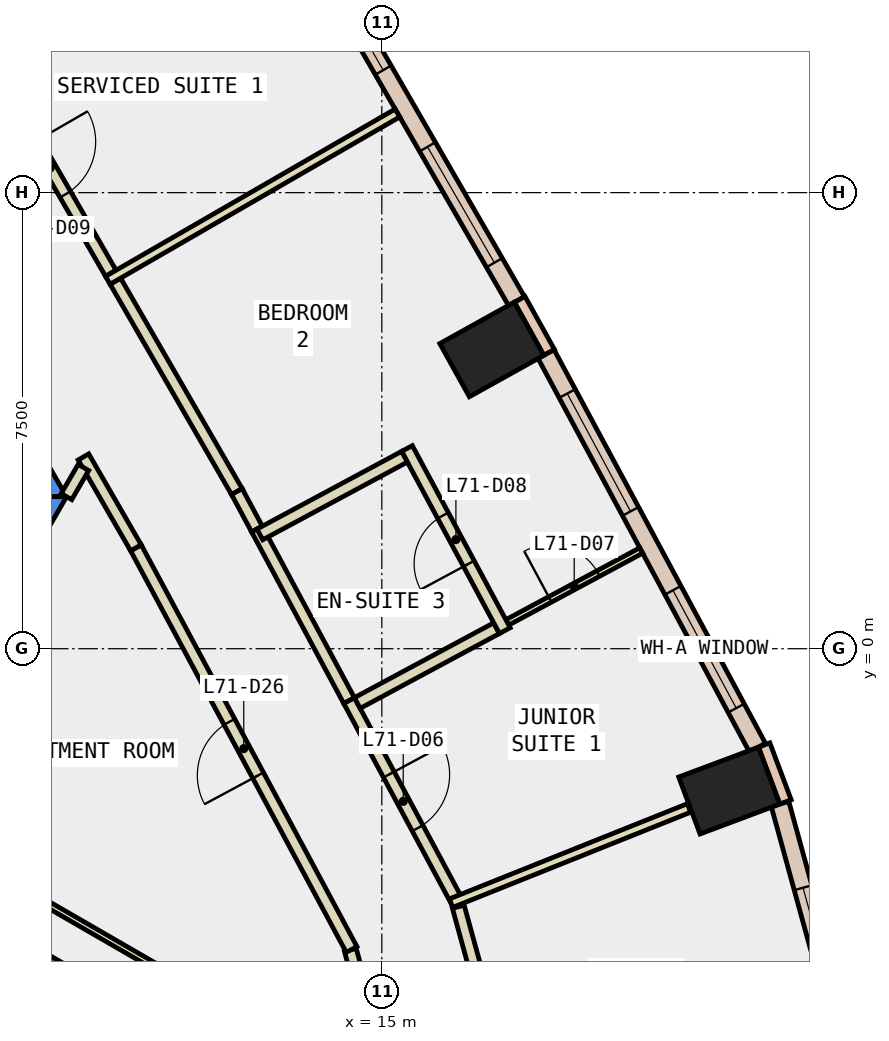
"""IFC4 building model, lengths in metres.
Left out: names, types, materials, properties, quantities, classifications, styles, units other than length and angle.
Written with IfcOpenShell. Run it as: python <this file> out.ifc"""

import sys

from ifc_helpers import new_model, si_unit, direction, frame, frame_2d, origin, origin_2d, place, context, subcontext, project, spatial, polyline, rectangle, outline, extrude, element, fill, save


model = new_model("IFC4")
c1 = context("Model", 3, precision=1e-05, world=origin(), true_north=direction((0.0, 1.0)))
c2 = subcontext(c1, "Body", "Model", "MODEL_VIEW")
j1 = project(units=[si_unit("LENGTHUNIT", "METRE"), si_unit("PLANEANGLEUNIT", "RADIAN")], contexts=[c1])
p1 = place(None, origin())
s1 = spatial("IfcSite", under=j1, at=p1, CompositionType="ELEMENT")
p2 = place(p1, origin())
s2 = spatial("IfcBuilding", under=s1, at=p2, CompositionType="ELEMENT")
p3 = place(p2, frame((0.0, 0.0, 304.4)))
s3 = spatial("IfcBuildingStorey", under=s2, at=p3, CompositionType="ELEMENT", Elevation=304.4)
for number, where, z_axis, x_axis in (
    (1, (20.714, -2.333, -0.34), (0.0, 0.0, 1.0), (-0.351, 0.936, 0.0)),
    (2, (16.809, 4.921, -0.34), (0.0, 0.0, 1.0), (-0.486, 0.874, 0.0)),
):
    element("IfcColumn", number, at=place(p3, frame(where, z_axis=z_axis, x_axis=x_axis)), inside=s3, PredefinedType="COLUMN", context=c2, shape_type="SweptSolid", body=[
        extrude(rectangle(XDim=1.0, YDim=1.4, at=origin_2d()), origin(), (0.0, 0.0, 1.0), 3.6),
    ])
p4 = place(p3, frame((0.0, 0.0, -0.34)))
e3 = element("IfcWall", 3, at=p4, inside=s3, PredefinedType="SHEAR", context=c2, shape_type="SweptSolid", body=[
    extrude(outline(polyline([(5.486, 9.998), (5.053, 9.748), (9.238, 2.5), (9.815, 2.5), (5.486, 9.998)])), origin(), (0.0, 0.0, 1.0), 3.6),
])
p5 = place(p3, frame((0.0, 0.0, -0.34)))
e4 = element("IfcWall", 4, at=p5, inside=s3, PredefinedType="SHEAR", context=c2, shape_type="SweptSolid", body=[
    extrude(outline(polyline([(4.907, -6.0), (9.815, 2.5), (9.238, 2.5), (4.619, -5.5), (4.907, -6.0)])), origin(), (0.0, 0.0, 1.0), 3.6),
])
p6 = place(p3, frame((6.279, -3.625, -0.34), z_axis=(0.0, 0.0, 1.0), x_axis=(0.866017533419, -0.500013631625, 0.0)))
e5 = element("IfcWall", 5, at=p6, inside=s3, PredefinedType="SHEAR", context=c2, shape_type="SweptSolid", body=[
    extrude(rectangle(XDim=9.0, YDim=0.8, at=frame_2d((4.5, 0.0))), origin(), (0.0, 0.0, 1.0), 3.6),
])
p7 = place(p3, frame((21.639, -2.52, 0.0), z_axis=(0.0, 0.0, 1.0), x_axis=(-0.350962844851, 0.936389385637, 0.0)))
e6 = element("IfcWall", 6, at=p7, inside=s3, PredefinedType="STANDARD", context=c2, shape_type="SweptSolid", body=[
    extrude(rectangle(XDim=1.0, YDim=0.2, at=frame_2d((0.5, 0.0))), origin(), (0.0, 0.0, 1.0), 3.26),
])
p8 = place(p3, frame((17.752, 4.872, 0.0), z_axis=(0.0, 0.0, 1.0), x_axis=(-0.485850211157, 0.874042088414, 0.0)))
e7 = element("IfcWall", 7, at=p8, inside=s3, PredefinedType="STANDARD", context=c2, shape_type="SweptSolid", body=[
    extrude(rectangle(XDim=1.0, YDim=0.2, at=frame_2d((0.5, 0.0))), origin(), (0.0, 0.0, 1.0), 3.26),
])
p9 = place(p3, frame((22.677, -6.659, 0.0), z_axis=(0.0, 0.0, 1.0), x_axis=(-0.264892613927, 0.964277917971, 0.0)))
e8 = element("IfcWall", 8, at=p9, inside=s3, PredefinedType="STANDARD", context=c2, shape_type="SweptSolid", body=[
    extrude(rectangle(XDim=4.258, YDim=0.3, at=frame_2d((2.129, 0.0))), origin(), (0.0, 0.0, 1.0), 3.26),
])
p10 = place(p9, frame((1.429, 0.0, 0.9)))
e9 = element("IfcOpeningElement", 9, at=p10, cuts=e8, PredefinedType="OPENING", context=c2, shape_type="SweptSolid", body=[
    extrude(rectangle(XDim=1.4, YDim=2.0, at=frame_2d((0.7, 1.0))), frame((0.0, 0.16, 0.0), z_axis=(0.0, -1.0, 0.0), x_axis=(1.0, 0.0, 0.0)), (0.0, 0.0, 1.0), 0.32),
])
p11 = place(p3, frame((21.177, -1.626, 0.0), z_axis=(0.0, 0.0, 1.0), x_axis=(-0.473225522632, 0.880941317415, 0.0)))
e10 = element("IfcWall", 10, at=p11, inside=s3, PredefinedType="STANDARD", context=c2, shape_type="SweptSolid", body=[
    extrude(rectangle(XDim=7.345, YDim=0.3, at=frame_2d((3.673, 0.0))), origin(), (0.0, 0.0, 1.0), 3.26),
])
p12 = place(p11, frame((0.736, 0.0, 0.9)))
e11 = element("IfcOpeningElement", 11, at=p12, cuts=e10, PredefinedType="OPENING", context=c2, shape_type="SweptSolid", body=[
    extrude(rectangle(XDim=2.2, YDim=2.0, at=frame_2d((1.1, 1.0))), frame((0.0, 0.16, 0.0), z_axis=(0.0, -1.0, 0.0), x_axis=(1.0, 0.0, 0.0)), (0.0, 0.0, 1.0), 0.32),
])
p13 = place(p11, frame((4.409, 0.0, 0.9)))
e12 = element("IfcOpeningElement", 12, at=p13, cuts=e10, PredefinedType="OPENING", context=c2, shape_type="SweptSolid", body=[
    extrude(rectangle(XDim=2.2, YDim=2.0, at=frame_2d((1.1, 1.0))), frame((0.0, 0.16, 0.0), z_axis=(0.0, -1.0, 0.0), x_axis=(1.0, 0.0, 0.0)), (0.0, 0.0, 1.0), 0.32),
])
p14 = place(p3, frame((17.215, 5.717, 0.0), z_axis=(0.0, 0.0, 1.0), x_axis=(-0.499905472729, 0.866079972252, 0.0)))
e13 = element("IfcWall", 13, at=p14, inside=s3, PredefinedType="STANDARD", context=c2, shape_type="SweptSolid", body=[
    extrude(rectangle(XDim=7.313, YDim=0.3, at=frame_2d((3.657, 0.0))), origin(), (0.0, 0.0, 1.0), 3.26),
])
p15 = place(p14, frame((0.728, 0.0, 0.9)))
e14 = element("IfcOpeningElement", 14, at=p15, cuts=e13, PredefinedType="OPENING", context=c2, shape_type="SweptSolid", body=[
    extrude(rectangle(XDim=2.2, YDim=2.0, at=frame_2d((1.1, 1.0))), frame((0.0, 0.16, 0.0), z_axis=(0.0, -1.0, 0.0), x_axis=(1.0, 0.0, 0.0)), (0.0, 0.0, 1.0), 0.32),
])
p16 = place(p14, frame((4.385, 0.0, 0.9)))
e15 = element("IfcOpeningElement", 15, at=p16, cuts=e13, PredefinedType="OPENING", context=c2, shape_type="SweptSolid", body=[
    extrude(rectangle(XDim=2.2, YDim=2.0, at=frame_2d((1.1, 1.0))), frame((0.0, 0.16, 0.0), z_axis=(0.0, -1.0, 0.0), x_axis=(1.0, 0.0, 0.0)), (0.0, 0.0, 1.0), 0.32),
])
p17 = place(p3, frame((14.779, -6.032, 0.0), z_axis=(0.0, 0.0, 1.0), x_axis=(-0.265740072272, 0.964044715762, 0.0)))
e16 = element("IfcWall", 16, at=p17, inside=s3, PredefinedType="PARTITIONING", context=c2, shape_type="SweptSolid", body=[
    extrude(rectangle(XDim=1.118, YDim=0.2, at=frame_2d((0.559, 0.0))), origin(), (0.0, 0.0, 1.0), 3.26),
])
p18 = place(p3, frame((14.503, -4.946, 0.0), z_axis=(0.0, 0.0, 1.0), x_axis=(-0.473101362557, 0.881008002658, 0.0)))
e17 = element("IfcWall", 17, at=p18, inside=s3, PredefinedType="PARTITIONING", context=c2, shape_type="SweptSolid", body=[
    extrude(rectangle(XDim=7.497, YDim=0.2, at=frame_2d((3.749, 0.0))), origin(), (0.0, 0.0, 1.0), 3.26),
])
p19 = place(p18, frame((3.249, 0.0, 0.0)))
e18 = element("IfcOpeningElement", 18, at=p19, cuts=e17, PredefinedType="OPENING", context=c2, shape_type="SweptSolid", body=[
    extrude(rectangle(XDim=1.0, YDim=2.1, at=frame_2d((0.5, 1.05))), frame((0.0, 0.11, 0.0), z_axis=(0.0, -1.0, 0.0), x_axis=(1.0, 0.0, 0.0)), (0.0, 0.0, 1.0), 0.22),
])
p20 = place(p3, frame((10.956, 1.659, 0.0), z_axis=(0.0, 0.0, 1.0), x_axis=(-0.49992648901, 0.866067841215, 0.0)))
e19 = element("IfcWall", 19, at=p20, inside=s3, PredefinedType="PARTITIONING", context=c2, shape_type="SweptSolid", body=[
    extrude(rectangle(XDim=1.726, YDim=0.2, at=frame_2d((0.863, 0.0))), origin(), (0.0, 0.0, 1.0), 3.26),
])
p21 = place(p3, frame((10.092, 2.981, 0.0), z_axis=(0.0, 0.0, 1.0), x_axis=(-0.501296484717, -0.865275582927, 0.0)))
e20 = element("IfcWall", 20, at=p21, inside=s3, PredefinedType="PARTITIONING", context=c2, shape_type="SweptSolid", body=[
    extrude(rectangle(XDim=0.555, YDim=0.2, at=frame_2d((0.277, 0.0))), origin(), (0.0, 0.0, 1.0), 3.26),
])
p22 = place(p3, frame((16.258, -4.244, 0.0), z_axis=(0.0, 0.0, 1.0), x_axis=(0.264930673246, -0.964267462053, 0.0)))
e21 = element("IfcWall", 21, at=p22, inside=s3, PredefinedType="PARTITIONING", context=c2, shape_type="SweptSolid", body=[
    extrude(rectangle(XDim=3.166, YDim=0.2, at=frame_2d((1.583, 0.0))), origin(), (0.0, 0.0, 1.0), 3.26),
])
p23 = place(p3, frame((14.461, -0.852, 0.0), z_axis=(0.0, 0.0, 1.0), x_axis=(0.473160180459, -0.88097641491, 0.0)))
e22 = element("IfcWall", 22, at=p23, inside=s3, PredefinedType="PARTITIONING", context=c2, shape_type="SweptSolid", body=[
    extrude(rectangle(XDim=3.766, YDim=0.2, at=frame_2d((1.883, 0.0))), origin(), (0.0, 0.0, 1.0), 3.26),
])
p24 = place(p23, frame((1.383, 0.0, 0.0)))
e23 = element("IfcOpeningElement", 23, at=p24, cuts=e22, PredefinedType="OPENING", context=c2, shape_type="SweptSolid", body=[
    extrude(rectangle(XDim=1.0, YDim=2.1, at=frame_2d((0.5, 1.05))), frame((0.0, 0.11, 0.0), z_axis=(0.0, -1.0, 0.0), x_axis=(1.0, 0.0, 0.0)), (0.0, 0.0, 1.0), 0.22),
])
p25 = place(p3, frame((10.618, 6.044, 0.0), z_axis=(0.0, 0.0, 1.0), x_axis=(0.50008212199, -0.86597798544, 0.0)))
e24 = element("IfcWall", 24, at=p25, inside=s3, PredefinedType="PARTITIONING", context=c2, shape_type="SweptSolid", body=[
    extrude(rectangle(XDim=3.995, YDim=0.2, at=frame_2d((1.998, 0.0))), origin(), (0.0, 0.0, 1.0), 3.26),
])
p26 = place(p3, frame((12.616, 2.584, 0.0), z_axis=(0.0, 0.0, 1.0), x_axis=(0.472830911699, -0.881153181315, 0.0)))
e25 = element("IfcWall", 25, at=p26, inside=s3, PredefinedType="PARTITIONING", context=c2, shape_type="SweptSolid", body=[
    extrude(rectangle(XDim=0.7, YDim=0.2, at=frame_2d((0.35, 0.0))), origin(), (0.0, 0.0, 1.0), 3.26),
])
p27 = place(p3, frame((12.947, 1.967, 0.0), z_axis=(0.0, 0.0, 1.0), x_axis=(0.473116768279, -0.88099972961, 0.0)))
e26 = element("IfcWall", 26, at=p27, inside=s3, PredefinedType="PARTITIONING", context=c2, shape_type="SweptSolid", body=[
    extrude(rectangle(XDim=3.2, YDim=0.2, at=frame_2d((1.6, 0.0))), origin(), (0.0, 0.0, 1.0), 3.26),
])
p28 = place(p3, frame((8.545, 9.634, 0.0), z_axis=(0.0, 0.0, 1.0), x_axis=(0.50008212199, -0.86597798544, 0.0)))
e27 = element("IfcWall", 27, at=p28, inside=s3, PredefinedType="PARTITIONING", context=c2, shape_type="SweptSolid", body=[
    extrude(rectangle(XDim=3.995, YDim=0.2, at=frame_2d((1.998, 0.0))), origin(), (0.0, 0.0, 1.0), 3.26),
])
p29 = place(p28, frame((1.498, 0.0, 0.0)))
e28 = element("IfcOpeningElement", 28, at=p29, cuts=e27, PredefinedType="OPENING", context=c2, shape_type="SweptSolid", body=[
    extrude(rectangle(XDim=1.0, YDim=2.1, at=frame_2d((0.5, 1.05))), frame((0.0, 0.11, 0.0), z_axis=(0.0, -1.0, 0.0), x_axis=(1.0, 0.0, 0.0)), (0.0, 0.0, 1.0), 0.22),
])
p30 = place(p3, frame((6.835, -2.662, 0.0), z_axis=(0.0, 0.0, 1.0), x_axis=(0.866023427642, -0.500003422764, 0.0)))
e29 = element("IfcWall", 29, at=p30, inside=s3, PredefinedType="PARTITIONING", context=c2, shape_type="SweptSolid", body=[
    extrude(rectangle(XDim=8.65, YDim=0.1, at=frame_2d((4.325, 0.0))), origin(), (0.0, 0.0, 1.0), 3.26),
])
p31 = place(p3, frame((16.138, -4.185, 0.0), z_axis=(0.0, 0.0, 1.0), x_axis=(0.928432751736, 0.371500505388, 0.0)))
e30 = element("IfcWall", 30, at=p31, inside=s3, PredefinedType="PARTITIONING", context=c2, shape_type="SweptSolid", body=[
    extrude(rectangle(XDim=4.216, YDim=0.15, at=frame_2d((2.108, 0.0))), origin(), (0.0, 0.0, 1.0), 3.26),
])
p32 = place(p3, frame((17.063, 0.432, 0.0), z_axis=(0.0, 0.0, 1.0), x_axis=(0.881003472222, 0.473109799024, 0.0)))
e31 = element("IfcWall", 31, at=p32, inside=s3, PredefinedType="PARTITIONING", context=c2, shape_type="SweptSolid", body=[
    extrude(rectangle(XDim=2.501, YDim=0.1, at=frame_2d((1.25, 0.0))), origin(), (0.0, 0.0, 1.0), 3.26),
])
p33 = place(p32, frame((0.8, 0.0, 0.0)))
e32 = element("IfcOpeningElement", 32, at=p33, cuts=e31, PredefinedType="OPENING", context=c2, shape_type="SweptSolid", body=[
    extrude(rectangle(XDim=0.9, YDim=2.1, at=frame_2d((0.45, 1.05))), frame((0.0, 0.06, 0.0), z_axis=(0.0, -1.0, 0.0), x_axis=(1.0, 0.0, 0.0)), (0.0, 0.0, 1.0), 0.12),
])
p34 = place(p3, frame((14.597, -0.893, 0.0), z_axis=(0.0, 0.0, 1.0), x_axis=(0.880971229432, 0.473169835168, 0.0)))
e33 = element("IfcWall", 33, at=p34, inside=s3, PredefinedType="PARTITIONING", context=c2, shape_type="SweptSolid", body=[
    extrude(rectangle(XDim=2.599, YDim=0.2, at=frame_2d((1.3, 0.0))), origin(), (0.0, 0.0, 1.0), 3.26),
])
p35 = place(p3, frame((17.023, 0.297, 0.0), z_axis=(0.0, 0.0, 1.0), x_axis=(-0.473247398557, 0.88092956572, 0.0)))
e34 = element("IfcWall", 34, at=p35, inside=s3, PredefinedType="PARTITIONING", context=c2, shape_type="SweptSolid", body=[
    extrude(rectangle(XDim=3.4, YDim=0.2, at=frame_2d((1.7, 0.0))), origin(), (0.0, 0.0, 1.0), 3.26),
])
p36 = place(p35, frame((1.25, 0.0, 0.0)))
e35 = element("IfcOpeningElement", 35, at=p36, cuts=e34, PredefinedType="OPENING", context=c2, shape_type="SweptSolid", body=[
    extrude(rectangle(XDim=0.9, YDim=2.1, at=frame_2d((0.45, 1.05))), frame((0.0, 0.11, 0.0), z_axis=(0.0, -1.0, 0.0), x_axis=(1.0, 0.0, 0.0)), (0.0, 0.0, 1.0), 0.22),
])
p37 = place(p3, frame((15.373, 3.157, 0.0), z_axis=(0.0, 0.0, 1.0), x_axis=(-0.880935111027, -0.473237076062, 0.0)))
e36 = element("IfcWall", 36, at=p37, inside=s3, PredefinedType="PARTITIONING", context=c2, shape_type="SweptSolid", body=[
    extrude(rectangle(XDim=2.701, YDim=0.2, at=frame_2d((1.35, 0.0))), origin(), (0.0, 0.0, 1.0), 3.26),
])
p38 = place(p3, frame((10.494, 6.059, 0.0), z_axis=(0.0, 0.0, 1.0), x_axis=(0.866027397988, 0.499996545922, 0.0)))
e37 = element("IfcWall", 37, at=p38, inside=s3, PredefinedType="PARTITIONING", context=c2, shape_type="SweptSolid", body=[
    extrude(rectangle(XDim=5.5, YDim=0.15, at=frame_2d((2.75, 0.0))), origin(), (0.0, 0.0, 1.0), 3.26),
])
p39 = place(p10, origin())
e38 = element("IfcWindow", 38, at=p39, inside=s3, PartitioningType="SINGLE_PANEL", PredefinedType="WINDOW", context=c2, shape_type="SweptSolid", body=[
    extrude(rectangle(XDim=1.4, YDim=2.0, at=frame_2d((0.7, 1.0))), frame((0.0, 0.03, 0.0), z_axis=(0.0, -1.0, 0.0), x_axis=(1.0, 0.0, 0.0)), (0.0, 0.0, 1.0), 0.06),
])
fill(e9, e38)
p40 = place(p12, origin())
e39 = element("IfcWindow", 39, at=p40, inside=s3, PartitioningType="SINGLE_PANEL", PredefinedType="WINDOW", context=c2, shape_type="SweptSolid", body=[
    extrude(rectangle(XDim=2.2, YDim=2.0, at=frame_2d((1.1, 1.0))), frame((0.0, 0.03, 0.0), z_axis=(0.0, -1.0, 0.0), x_axis=(1.0, 0.0, 0.0)), (0.0, 0.0, 1.0), 0.06),
])
fill(e11, e39)
p41 = place(p13, origin())
e40 = element("IfcWindow", 40, at=p41, inside=s3, PartitioningType="SINGLE_PANEL", PredefinedType="WINDOW", context=c2, shape_type="SweptSolid", body=[
    extrude(rectangle(XDim=2.2, YDim=2.0, at=frame_2d((1.1, 1.0))), frame((0.0, 0.03, 0.0), z_axis=(0.0, -1.0, 0.0), x_axis=(1.0, 0.0, 0.0)), (0.0, 0.0, 1.0), 0.06),
])
fill(e12, e40)
p42 = place(p15, origin())
e41 = element("IfcWindow", 41, at=p42, inside=s3, PartitioningType="SINGLE_PANEL", PredefinedType="WINDOW", context=c2, shape_type="SweptSolid", body=[
    extrude(rectangle(XDim=2.2, YDim=2.0, at=frame_2d((1.1, 1.0))), frame((0.0, 0.03, 0.0), z_axis=(0.0, -1.0, 0.0), x_axis=(1.0, 0.0, 0.0)), (0.0, 0.0, 1.0), 0.06),
])
fill(e14, e41)
p43 = place(p16, origin())
e42 = element("IfcWindow", 42, at=p43, inside=s3, PartitioningType="SINGLE_PANEL", PredefinedType="WINDOW", context=c2, shape_type="SweptSolid", body=[
    extrude(rectangle(XDim=2.2, YDim=2.0, at=frame_2d((1.1, 1.0))), frame((0.0, 0.03, 0.0), z_axis=(0.0, -1.0, 0.0), x_axis=(1.0, 0.0, 0.0)), (0.0, 0.0, 1.0), 0.06),
])
fill(e15, e42)
p44 = place(p24, origin())
e43 = element("IfcDoor", 43, at=p44, inside=s3, OperationType="SINGLE_SWING_LEFT", PredefinedType="DOOR", context=c2, shape_type="SweptSolid", body=[
    extrude(rectangle(XDim=1.0, YDim=2.1, at=frame_2d((0.5, 1.05))), frame((0.0, 0.025, 0.0), z_axis=(0.0, -1.0, 0.0), x_axis=(1.0, 0.0, 0.0)), (0.0, 0.0, 1.0), 0.05),
])
fill(e23, e43)
p45 = place(p33, origin())
e44 = element("IfcDoor", 44, at=p45, inside=s3, OperationType="SINGLE_SWING_LEFT", PredefinedType="DOOR", context=c2, shape_type="SweptSolid", body=[
    extrude(rectangle(XDim=0.9, YDim=2.1, at=frame_2d((0.45, 1.05))), frame((0.0, 0.025, 0.0), z_axis=(0.0, -1.0, 0.0), x_axis=(1.0, 0.0, 0.0)), (0.0, 0.0, 1.0), 0.05),
])
fill(e32, e44)
p46 = place(p36, origin())
e45 = element("IfcDoor", 45, at=p46, inside=s3, OperationType="SINGLE_SWING_LEFT", PredefinedType="DOOR", context=c2, shape_type="SweptSolid", body=[
    extrude(rectangle(XDim=0.9, YDim=2.1, at=frame_2d((0.45, 1.05))), frame((0.0, 0.025, 0.0), z_axis=(0.0, -1.0, 0.0), x_axis=(1.0, 0.0, 0.0)), (0.0, 0.0, 1.0), 0.05),
])
fill(e35, e45)
p47 = place(p29, origin())
e46 = element("IfcDoor", 46, at=p47, inside=s3, OperationType="SINGLE_SWING_LEFT", PredefinedType="DOOR", context=c2, shape_type="SweptSolid", body=[
    extrude(rectangle(XDim=1.0, YDim=2.1, at=frame_2d((0.5, 1.05))), frame((0.0, 0.025, 0.0), z_axis=(0.0, -1.0, 0.0), x_axis=(1.0, 0.0, 0.0)), (0.0, 0.0, 1.0), 0.05),
])
fill(e28, e46)
p48 = place(p19, origin())
e47 = element("IfcDoor", 47, at=p48, inside=s3, OperationType="SINGLE_SWING_LEFT", PredefinedType="DOOR", context=c2, shape_type="SweptSolid", body=[
    extrude(rectangle(XDim=1.0, YDim=2.1, at=frame_2d((0.5, 1.05))), frame((0.0, 0.025, 0.0), z_axis=(0.0, -1.0, 0.0), x_axis=(1.0, 0.0, 0.0)), (0.0, 0.0, 1.0), 0.05),
])
fill(e18, e47)
save(model, sys.argv[1])
